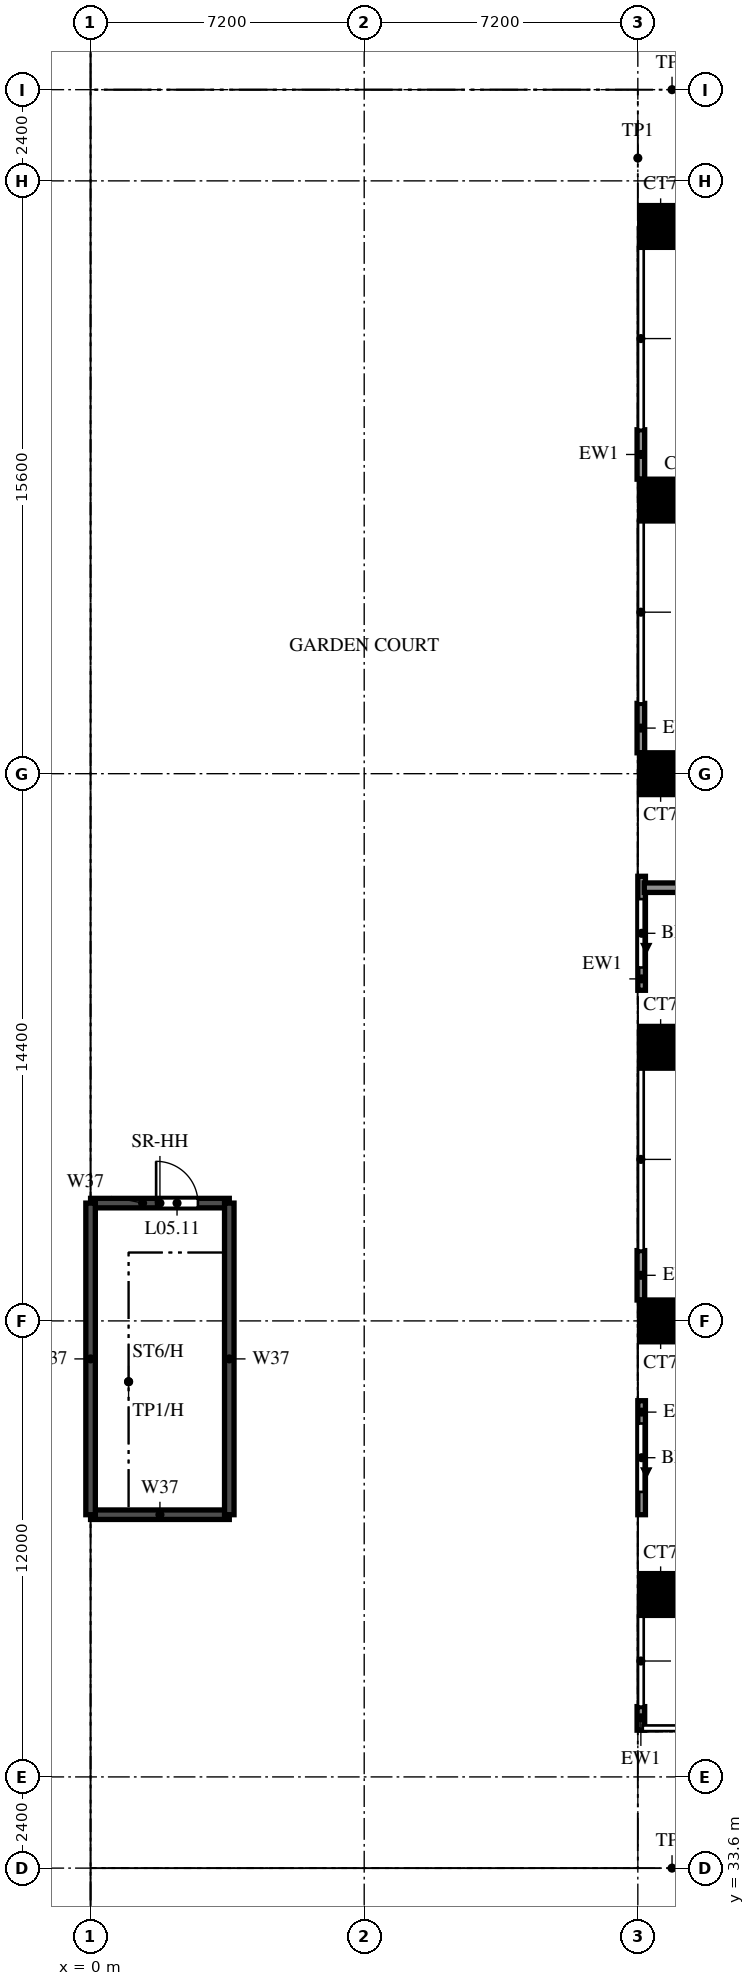
"""IFC4 building model, lengths in metres.
Left out: names, types, materials, properties, quantities, classifications, styles, units other than length and angle.
Written with IfcOpenShell. Run it as: python <this file> out.ifc"""

import sys

from ifc_helpers import new_model, si_unit, direction, frame, frame_2d, origin, origin_2d, place, context, subcontext, project, spatial, rectangle, extrude, source, transform, mapped, element, fill, save


model = new_model("IFC4")
c1 = context("Model", 3, precision=1e-05, world=origin(), true_north=direction((0.0, 1.0)))
c2 = subcontext(c1, "Body", "Model", "MODEL_VIEW")
j1 = project(units=[si_unit("LENGTHUNIT", "METRE"), si_unit("PLANEANGLEUNIT", "RADIAN")], contexts=[c1])
p1 = place(None, origin())
s1 = spatial("IfcSite", under=j1, at=p1, CompositionType="ELEMENT")
p2 = place(p1, origin())
s2 = spatial("IfcBuilding", under=s1, at=p2, CompositionType="ELEMENT")
p3 = place(p2, frame((0.0, 0.0, 27.0)))
s3 = spatial("IfcBuildingStorey", under=s2, at=p3, CompositionType="ELEMENT", Elevation=27.0)
m1 = source(origin(), c2, "Body", "SweptSolid", [
    extrude(rectangle(XDim=1.1, YDim=1.1, at=origin_2d()), origin(), (0.0, 0.0, 1.0), 3.18),
])
for number, where, z_axis, x_axis in (
    (1, (15.0, 40.8, 0.0), (0.0, 0.0, 1.0), (1.0, 0.0, 0.0)),
    (2, (15.0, 48.0, 0.0), (0.0, 0.0, 1.0), (1.0, 0.0, 0.0)),
    (3, (15.0, 55.2, 0.0), (0.0, 0.0, 1.0), (1.0, 0.0, 0.0)),
    (4, (15.0, 62.4, 0.0), (0.0, 0.0, 1.0), (1.0, 0.0, 0.0)),
    (5, (15.0, 69.6, 0.0), (0.0, 0.0, 1.0), (1.0, 0.0, 0.0)),
    (6, (15.0, 76.8, 0.0), (0.0, 0.0, 1.0), (1.0, 0.0, 0.0)),
):
    element("IfcColumn", number, at=place(p3, frame(where, z_axis=z_axis, x_axis=x_axis)), inside=s3, PredefinedType="COLUMN", context=c2, shape_type="MappedRepresentation", body=[
        mapped(m1, transform((0.0, 0.0, 0.0))),
    ])
p4 = place(p3, frame((14.5, 59.7, 0.0), z_axis=(0.0, 0.0, 1.0), x_axis=(0.0, -1.0, 0.0)))
e7 = element("IfcWall", 7, at=p4, inside=s3, PredefinedType="SOLIDWALL", context=c2, shape_type="SweptSolid", body=[
    extrude(rectangle(XDim=3.0, YDim=0.2, at=frame_2d((1.5, 0.0))), origin(), (0.0, 0.0, 1.0), 3.18),
])
p5 = place(p4, frame((0.6, 0.0, 0.0)))
e8 = element("IfcOpeningElement", 8, at=p5, cuts=e7, PredefinedType="OPENING", context=c2, shape_type="SweptSolid", body=[
    extrude(rectangle(XDim=1.8, YDim=2.4, at=frame_2d((0.9, 1.2))), frame((0.0, 0.11, 0.0), z_axis=(0.0, -1.0, 0.0), x_axis=(1.0, 0.0, 0.0)), (0.0, 0.0, 1.0), 0.22),
])
p6 = place(p3, frame((14.5, 45.9, 0.0), z_axis=(0.0, 0.0, 1.0), x_axis=(0.0, -1.0, 0.0)))
e9 = element("IfcWall", 9, at=p6, inside=s3, PredefinedType="SOLIDWALL", context=c2, shape_type="SweptSolid", body=[
    extrude(rectangle(XDim=3.0, YDim=0.2, at=frame_2d((1.5, 0.0))), origin(), (0.0, 0.0, 1.0), 3.18),
])
p7 = place(p6, frame((0.6, 0.0, 0.0)))
e10 = element("IfcOpeningElement", 10, at=p7, cuts=e9, PredefinedType="OPENING", context=c2, shape_type="SweptSolid", body=[
    extrude(rectangle(XDim=1.8, YDim=2.4, at=frame_2d((0.9, 1.2))), frame((0.0, 0.11, 0.0), z_axis=(0.0, -1.0, 0.0), x_axis=(1.0, 0.0, 0.0)), (0.0, 0.0, 1.0), 0.22),
])
for number, where, z_axis, x_axis in (
    (11, (14.48, 71.45, 0.0), (0.0, 0.0, 1.0), (0.0, -1.0, 0.0)),
    (12, (14.48, 64.25, 0.0), (0.0, 0.0, 1.0), (0.0, -1.0, 0.0)),
    (13, (14.48, 49.85, 0.0), (0.0, 0.0, 1.0), (0.0, -1.0, 0.0)),
):
    element("IfcWall", number, at=place(p3, frame(where, z_axis=z_axis, x_axis=x_axis)), inside=s3, PredefinedType="SOLIDWALL", context=c2, shape_type="SweptSolid", body=[
        extrude(rectangle(XDim=1.3, YDim=0.2, at=frame_2d((0.65, 0.0))), origin(), (0.0, 0.0, 1.0), 3.18),
    ])
p8 = place(p3, frame((14.48, 37.85, 0.0), z_axis=(0.0, 0.0, 1.0), x_axis=(0.0, -1.0, 0.0)))
e14 = element("IfcWall", 14, at=p8, inside=s3, PredefinedType="SOLIDWALL", context=c2, shape_type="SweptSolid", body=[
    extrude(rectangle(XDim=0.62, YDim=0.2, at=frame_2d((0.31, 0.0))), origin(), (0.0, 0.0, 1.0), 3.18),
])
p9 = place(p3, frame((0.0, 42.9, 0.0), z_axis=(0.0, 0.0, 1.0), x_axis=(1.0, 0.0, 0.0)))
e15 = element("IfcWall", 15, at=p9, inside=s3, PredefinedType="SOLIDWALL", context=c2, shape_type="SweptSolid", body=[
    extrude(rectangle(XDim=3.65, YDim=0.25, at=frame_2d((1.825, 0.0))), origin(), (0.0, 0.0, 1.0), 3.18),
])
p10 = place(p3, frame((14.57, 48.0, 0.0), z_axis=(0.0, 0.0, 1.0), x_axis=(1.0, 0.0, 0.0)))
e16 = element("IfcWall", 16, at=p10, inside=s3, PredefinedType="SOLIDWALL", context=c2, shape_type="SweptSolid", body=[
    extrude(rectangle(XDim=19.03, YDim=0.25, at=frame_2d((9.515, 0.0))), origin(), (0.0, 0.0, 1.0), 3.18),
])
p11 = place(p3, frame((0.0, 51.1, 0.0), z_axis=(0.0, 0.0, 1.0), x_axis=(1.0, 0.0, 0.0)))
e17 = element("IfcWall", 17, at=p11, inside=s3, PredefinedType="SOLIDWALL", context=c2, shape_type="SweptSolid", body=[
    extrude(rectangle(XDim=3.65, YDim=0.25, at=frame_2d((1.825, 0.0))), origin(), (0.0, 0.0, 1.0), 3.18),
])
p12 = place(p11, frame((1.725, 0.0, 0.0)))
e18 = element("IfcOpeningElement", 18, at=p12, cuts=e17, PredefinedType="OPENING", context=c2, shape_type="SweptSolid", body=[
    extrude(rectangle(XDim=1.1, YDim=2.1, at=frame_2d((0.55, 1.05))), frame((0.0, 0.135, 0.0), z_axis=(0.0, -1.0, 0.0), x_axis=(1.0, 0.0, 0.0)), (0.0, 0.0, 1.0), 0.27),
])
p13 = place(p3, frame((14.57, 59.4, 0.0), z_axis=(0.0, 0.0, 1.0), x_axis=(1.0, 0.0, 0.0)))
e19 = element("IfcWall", 19, at=p13, inside=s3, PredefinedType="SOLIDWALL", context=c2, shape_type="SweptSolid", body=[
    extrude(rectangle(XDim=16.03, YDim=0.25, at=frame_2d((8.015, 0.0))), origin(), (0.0, 0.0, 1.0), 2.28),
])
p14 = place(p13, frame((7.38, 0.0, 0.0)))
e20 = element("IfcOpeningElement", 20, at=p14, cuts=e19, PredefinedType="OPENING", context=c2, shape_type="SweptSolid", body=[
    extrude(rectangle(XDim=1.1, YDim=2.1, at=frame_2d((0.55, 1.05))), frame((0.0, 0.135, 0.0), z_axis=(0.0, -1.0, 0.0), x_axis=(1.0, 0.0, 0.0)), (0.0, 0.0, 1.0), 0.27),
])
p15 = place(p3, frame((14.57, 62.4, 0.0), z_axis=(0.0, 0.0, 1.0), x_axis=(1.0, 0.0, 0.0)))
e21 = element("IfcWall", 21, at=p15, inside=s3, PredefinedType="SOLIDWALL", context=c2, shape_type="SweptSolid", body=[
    extrude(rectangle(XDim=14.23, YDim=0.25, at=frame_2d((7.115, 0.0))), origin(), (0.0, 0.0, 1.0), 3.18),
])
p16 = place(p15, frame((5.08, 0.0, 0.0)))
e22 = element("IfcOpeningElement", 22, at=p16, cuts=e21, PredefinedType="OPENING", context=c2, shape_type="SweptSolid", body=[
    extrude(rectangle(XDim=1.1, YDim=2.1, at=frame_2d((0.55, 1.05))), frame((0.0, 0.135, 0.0), z_axis=(0.0, -1.0, 0.0), x_axis=(1.0, 0.0, 0.0)), (0.0, 0.0, 1.0), 0.27),
])
for number, where, z_axis, x_axis in (
    (23, (0.0, 42.9, 0.0), (0.0, 0.0, 1.0), (0.0, 1.0, 0.0)),
    (24, (3.65, 42.9, 0.0), (0.0, 0.0, 1.0), (0.0, 1.0, 0.0)),
):
    element("IfcWall", number, at=place(p3, frame(where, z_axis=z_axis, x_axis=x_axis)), inside=s3, PredefinedType="SOLIDWALL", context=c2, shape_type="SweptSolid", body=[
        extrude(rectangle(XDim=8.2, YDim=0.25, at=frame_2d((4.1, 0.0))), origin(), (0.0, 0.0, 1.0), 3.18),
    ])
p17 = place(p5, origin())
e25 = element("IfcDoor", 25, at=p17, inside=s3, OperationType="DOUBLE_DOOR_SLIDING", PredefinedType="DOOR", context=c2, shape_type="SweptSolid", body=[
    extrude(rectangle(XDim=1.8, YDim=2.4, at=frame_2d((0.9, 1.2))), frame((0.0, 0.025, 0.0), z_axis=(0.0, -1.0, 0.0), x_axis=(1.0, 0.0, 0.0)), (0.0, 0.0, 1.0), 0.05),
])
fill(e8, e25)
p18 = place(p7, origin())
e26 = element("IfcDoor", 26, at=p18, inside=s3, OperationType="DOUBLE_DOOR_SLIDING", PredefinedType="DOOR", context=c2, shape_type="SweptSolid", body=[
    extrude(rectangle(XDim=1.8, YDim=2.4, at=frame_2d((0.9, 1.2))), frame((0.0, 0.025, 0.0), z_axis=(0.0, -1.0, 0.0), x_axis=(1.0, 0.0, 0.0)), (0.0, 0.0, 1.0), 0.05),
])
fill(e10, e26)
p19 = place(p12, origin())
e27 = element("IfcDoor", 27, at=p19, inside=s3, OperationType="SINGLE_SWING_RIGHT", PredefinedType="DOOR", context=c2, shape_type="SweptSolid", body=[
    extrude(rectangle(XDim=1.1, YDim=2.1, at=frame_2d((0.55, 1.05))), frame((0.0, 0.025, 0.0), z_axis=(0.0, -1.0, 0.0), x_axis=(1.0, 0.0, 0.0)), (0.0, 0.0, 1.0), 0.05),
])
fill(e18, e27)
save(model, sys.argv[1])
